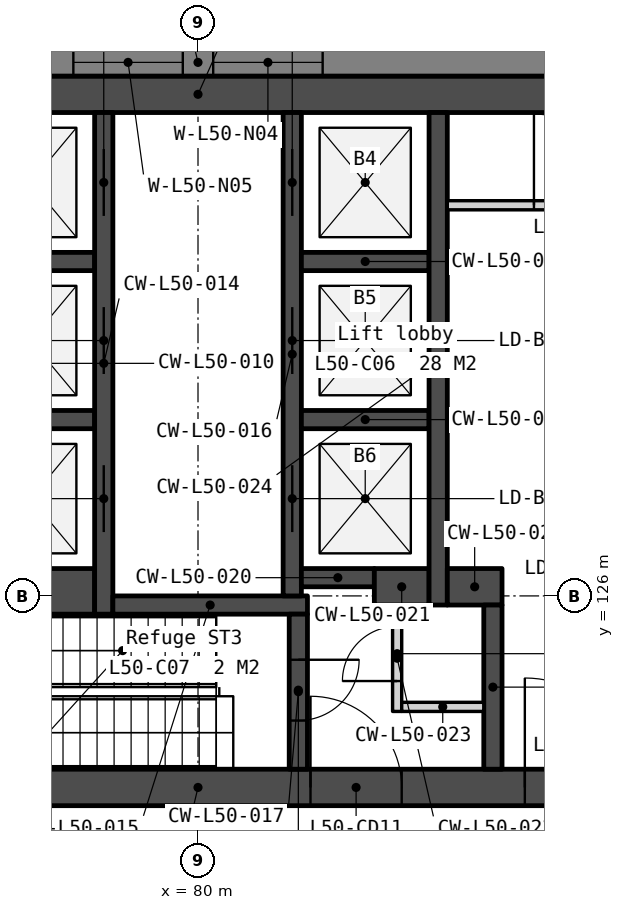
"""IFC4 building model, lengths in metres.
Left out: names, types, materials, properties, quantities, classifications, styles, units other than length and angle.
Written with IfcOpenShell. Run it as: python <this file> out.ifc"""

import sys

from ifc_helpers import new_model, si_unit, direction, frame, frame_2d, origin, place, context, subcontext, project, spatial, polyline, rectangle, outline, extrude, element, fill, save


model = new_model("IFC4")
c1 = context("Model", 3, precision=1e-05, world=origin(), true_north=direction((0.0, 1.0)))
c2 = subcontext(c1, "Body", "Model", "MODEL_VIEW")
j1 = project(units=[si_unit("LENGTHUNIT", "METRE"), si_unit("PLANEANGLEUNIT", "RADIAN")], contexts=[c1])
p1 = place(None, origin())
s1 = spatial("IfcSite", under=j1, at=p1, CompositionType="ELEMENT")
p2 = place(p1, origin())
s2 = spatial("IfcBuilding", under=s1, at=p2, CompositionType="ELEMENT")
p3 = place(p2, frame((0.0, 0.0, 199.7)))
s3 = spatial("IfcBuildingStorey", under=s2, at=p3, CompositionType="ELEMENT", Elevation=199.7)
p4 = place(p3, frame((69.0, 134.25, 0.0), z_axis=(0.0, 0.0, 1.0), x_axis=(1.0, 0.0, 0.0)))
e1 = element("IfcWall", 1, at=p4, inside=s3, PredefinedType="SOLIDWALL", context=c2, shape_type="SweptSolid", body=[
    extrude(rectangle(XDim=22.0, YDim=0.6, at=frame_2d((11.0, 0.0))), origin(), (0.0, 0.0, 1.0), 3.75),
])
p5 = place(p3, frame((69.0, 122.85, 0.0), z_axis=(0.0, 0.0, 1.0), x_axis=(1.0, 0.0, 0.0)))
e2 = element("IfcWall", 2, at=p5, inside=s3, PredefinedType="SOLIDWALL", context=c2, shape_type="SweptSolid", body=[
    extrude(rectangle(XDim=22.0, YDim=0.6, at=frame_2d((11.0, 0.0))), origin(), (0.0, 0.0, 1.0), 3.75),
])
p6 = place(p5, frame((16.375, 0.0, 0.0)))
e3 = element("IfcOpeningElement", 3, at=p6, cuts=e2, PredefinedType="OPENING", context=c2, shape_type="SweptSolid", body=[
    extrude(rectangle(XDim=1.8, YDim=2.1, at=frame_2d((0.9, 1.05))), frame((0.0, 0.31, 0.0), z_axis=(0.0, -1.0, 0.0), x_axis=(1.0, 0.0, 0.0)), (0.0, 0.0, 1.0), 0.62),
])
p7 = place(p5, frame((3.825, 0.0, 0.0)))
e4 = element("IfcOpeningElement", 4, at=p7, cuts=e2, PredefinedType="OPENING", context=c2, shape_type="SweptSolid", body=[
    extrude(rectangle(XDim=1.8, YDim=2.1, at=frame_2d((0.9, 1.05))), frame((0.0, 0.31, 0.0), z_axis=(0.0, -1.0, 0.0), x_axis=(1.0, 0.0, 0.0)), (0.0, 0.0, 1.0), 0.62),
])
p8 = place(p5, frame((12.85, 0.0, 0.0)))
e5 = element("IfcOpeningElement", 5, at=p8, cuts=e2, PredefinedType="OPENING", context=c2, shape_type="SweptSolid", body=[
    extrude(rectangle(XDim=1.5, YDim=2.1, at=frame_2d((0.75, 1.05))), frame((0.0, 0.31, 0.0), z_axis=(0.0, -1.0, 0.0), x_axis=(1.0, 0.0, 0.0)), (0.0, 0.0, 1.0), 0.62),
])
for number, where, z_axis, x_axis in (
    (6, (76.2, 131.5, 0.0), (0.0, 0.0, 1.0), (1.0, 0.0, 0.0)),
    (7, (76.2, 128.9, 0.0), (0.0, 0.0, 1.0), (1.0, 0.0, 0.0)),
):
    element("IfcWall", number, at=place(p3, frame(where, z_axis=z_axis, x_axis=x_axis)), inside=s3, PredefinedType="SOLIDWALL", context=c2, shape_type="SweptSolid", body=[
        extrude(rectangle(XDim=2.1, YDim=0.3, at=frame_2d((1.05, 0.0))), origin(), (0.0, 0.0, 1.0), 3.75),
    ])
p9 = place(p3, frame((76.2, 126.075, 0.0), z_axis=(0.0, 0.0, 1.0), x_axis=(1.0, 0.0, 0.0)))
e8 = element("IfcWall", 8, at=p9, inside=s3, PredefinedType="SOLIDWALL", context=c2, shape_type="SweptSolid", body=[
    extrude(rectangle(XDim=2.1, YDim=0.75, at=frame_2d((1.05, 0.0))), origin(), (0.0, 0.0, 1.0), 3.75),
])
p10 = place(p3, frame((78.45, 133.95, 0.0), z_axis=(0.0, 0.0, 1.0), x_axis=(0.0, -1.0, 0.0)))
e9 = element("IfcWall", 9, at=p10, inside=s3, PredefinedType="SOLIDWALL", context=c2, shape_type="SweptSolid", body=[
    extrude(rectangle(XDim=8.25, YDim=0.3, at=frame_2d((4.125, 0.0))), origin(), (0.0, 0.0, 1.0), 3.75),
])
p11 = place(p10, frame((0.6, 0.0, 0.0)))
e10 = element("IfcOpeningElement", 10, at=p11, cuts=e9, PredefinedType="OPENING", context=c2, shape_type="SweptSolid", body=[
    extrude(rectangle(XDim=1.1, YDim=2.1, at=frame_2d((0.55, 1.05))), frame((0.0, 0.16, 0.0), z_axis=(0.0, -1.0, 0.0), x_axis=(1.0, 0.0, 0.0)), (0.0, 0.0, 1.0), 0.32),
])
p12 = place(p10, frame((3.2, 0.0, 0.0)))
e11 = element("IfcOpeningElement", 11, at=p12, cuts=e9, PredefinedType="OPENING", context=c2, shape_type="SweptSolid", body=[
    extrude(rectangle(XDim=1.1, YDim=2.1, at=frame_2d((0.55, 1.05))), frame((0.0, 0.16, 0.0), z_axis=(0.0, -1.0, 0.0), x_axis=(1.0, 0.0, 0.0)), (0.0, 0.0, 1.0), 0.32),
])
p13 = place(p10, frame((5.8, 0.0, 0.0)))
e12 = element("IfcOpeningElement", 12, at=p13, cuts=e9, PredefinedType="OPENING", context=c2, shape_type="SweptSolid", body=[
    extrude(rectangle(XDim=1.1, YDim=2.1, at=frame_2d((0.55, 1.05))), frame((0.0, 0.16, 0.0), z_axis=(0.0, -1.0, 0.0), x_axis=(1.0, 0.0, 0.0)), (0.0, 0.0, 1.0), 0.32),
])
p14 = place(p3, frame((78.6, 125.85, 0.0), z_axis=(0.0, 0.0, 1.0), x_axis=(1.0, 0.0, 0.0)))
e13 = element("IfcWall", 13, at=p14, inside=s3, PredefinedType="SOLIDWALL", context=c2, shape_type="SweptSolid", body=[
    extrude(rectangle(XDim=3.2, YDim=0.3, at=frame_2d((1.6, 0.0))), origin(), (0.0, 0.0, 1.0), 3.75),
])
p15 = place(p3, frame((81.55, 133.95, 0.0), z_axis=(0.0, 0.0, 1.0), x_axis=(0.0, -1.0, 0.0)))
e14 = element("IfcWall", 14, at=p15, inside=s3, PredefinedType="SOLIDWALL", context=c2, shape_type="SweptSolid", body=[
    extrude(rectangle(XDim=7.95, YDim=0.3, at=frame_2d((3.975, 0.0))), origin(), (0.0, 0.0, 1.0), 3.75),
])
p16 = place(p15, frame((0.6, 0.0, 0.0)))
e15 = element("IfcOpeningElement", 15, at=p16, cuts=e14, PredefinedType="OPENING", context=c2, shape_type="SweptSolid", body=[
    extrude(rectangle(XDim=1.1, YDim=2.1, at=frame_2d((0.55, 1.05))), frame((0.0, 0.16, 0.0), z_axis=(0.0, -1.0, 0.0), x_axis=(1.0, 0.0, 0.0)), (0.0, 0.0, 1.0), 0.32),
])
p17 = place(p15, frame((3.2, 0.0, 0.0)))
e16 = element("IfcOpeningElement", 16, at=p17, cuts=e14, PredefinedType="OPENING", context=c2, shape_type="SweptSolid", body=[
    extrude(rectangle(XDim=1.1, YDim=2.1, at=frame_2d((0.55, 1.05))), frame((0.0, 0.16, 0.0), z_axis=(0.0, -1.0, 0.0), x_axis=(1.0, 0.0, 0.0)), (0.0, 0.0, 1.0), 0.32),
])
p18 = place(p15, frame((5.8, 0.0, 0.0)))
e17 = element("IfcOpeningElement", 17, at=p18, cuts=e14, PredefinedType="OPENING", context=c2, shape_type="SweptSolid", body=[
    extrude(rectangle(XDim=1.1, YDim=2.1, at=frame_2d((0.55, 1.05))), frame((0.0, 0.16, 0.0), z_axis=(0.0, -1.0, 0.0), x_axis=(1.0, 0.0, 0.0)), (0.0, 0.0, 1.0), 0.32),
])
p19 = place(p3, frame((81.65, 125.7, 0.0), z_axis=(0.0, 0.0, 1.0), x_axis=(0.0, -1.0, 0.0)))
e18 = element("IfcWall", 18, at=p19, inside=s3, PredefinedType="SOLIDWALL", context=c2, shape_type="SweptSolid", body=[
    extrude(rectangle(XDim=2.55, YDim=0.3, at=frame_2d((1.275, 0.0))), origin(), (0.0, 0.0, 1.0), 3.75),
])
p20 = place(p19, frame((0.75, 0.0, 0.0)))
e19 = element("IfcOpeningElement", 19, at=p20, cuts=e18, PredefinedType="OPENING", context=c2, shape_type="SweptSolid", body=[
    extrude(rectangle(XDim=1.0, YDim=2.1, at=frame_2d((0.5, 1.05))), frame((0.0, 0.16, 0.0), z_axis=(0.0, -1.0, 0.0), x_axis=(1.0, 0.0, 0.0)), (0.0, 0.0, 1.0), 0.32),
])
for number, where, z_axis, x_axis in (
    (20, (81.7, 131.5, 0.0), (0.0, 0.0, 1.0), (1.0, 0.0, 0.0)),
    (21, (81.7, 128.9, 0.0), (0.0, 0.0, 1.0), (1.0, 0.0, 0.0)),
):
    element("IfcWall", number, at=place(p3, frame(where, z_axis=z_axis, x_axis=x_axis)), inside=s3, PredefinedType="SOLIDWALL", context=c2, shape_type="SweptSolid", body=[
        extrude(rectangle(XDim=2.1, YDim=0.3, at=frame_2d((1.05, 0.0))), origin(), (0.0, 0.0, 1.0), 3.75),
    ])
p21 = place(p3, frame((81.7, 126.3, 0.0), z_axis=(0.0, 0.0, 1.0), x_axis=(1.0, 0.0, 0.0)))
e22 = element("IfcWall", 22, at=p21, inside=s3, PredefinedType="SOLIDWALL", context=c2, shape_type="SweptSolid", body=[
    extrude(rectangle(XDim=1.2, YDim=0.3, at=frame_2d((0.6, 0.0))), origin(), (0.0, 0.0, 1.0), 3.75),
])
p22 = place(p3, frame((82.9, 126.15, 0.0), z_axis=(0.0, 0.0, 1.0), x_axis=(1.0, 0.0, 0.0)))
e23 = element("IfcWall", 23, at=p22, inside=s3, PredefinedType="SOLIDWALL", context=c2, shape_type="SweptSolid", body=[
    extrude(rectangle(XDim=0.9, YDim=0.6, at=frame_2d((0.45, 0.0))), origin(), (0.0, 0.0, 1.0), 3.75),
])
p23 = place(p3, frame((83.275, 125.85, 0.0), z_axis=(0.0, 0.0, 1.0), x_axis=(0.0, -1.0, 0.0)))
e24 = element("IfcWall", 24, at=p23, inside=s3, PredefinedType="PARTITIONING", context=c2, shape_type="SweptSolid", body=[
    extrude(rectangle(XDim=1.75, YDim=0.15, at=frame_2d((0.875, 0.0))), origin(), (0.0, 0.0, 1.0), 3.75),
])
p24 = place(p23, frame((0.35, 0.0, 0.0)))
e25 = element("IfcOpeningElement", 25, at=p24, cuts=e24, PredefinedType="OPENING", context=c2, shape_type="SweptSolid", body=[
    extrude(rectangle(XDim=0.9, YDim=2.1, at=frame_2d((0.45, 1.05))), frame((0.0, 0.085, 0.0), z_axis=(0.0, -1.0, 0.0), x_axis=(1.0, 0.0, 0.0)), (0.0, 0.0, 1.0), 0.17),
])
p25 = place(p3, frame((83.35, 124.175, 0.0), z_axis=(0.0, 0.0, 1.0), x_axis=(1.0, 0.0, 0.0)))
e26 = element("IfcWall", 26, at=p25, inside=s3, PredefinedType="PARTITIONING", context=c2, shape_type="SweptSolid", body=[
    extrude(rectangle(XDim=1.35, YDim=0.15, at=frame_2d((0.675, 0.0))), origin(), (0.0, 0.0, 1.0), 3.75),
])
p26 = place(p3, frame((83.95, 133.95, 0.0), z_axis=(0.0, 0.0, 1.0), x_axis=(0.0, -1.0, 0.0)))
e27 = element("IfcWall", 27, at=p26, inside=s3, PredefinedType="SOLIDWALL", context=c2, shape_type="SweptSolid", body=[
    extrude(rectangle(XDim=8.1, YDim=0.3, at=frame_2d((4.05, 0.0))), origin(), (0.0, 0.0, 1.0), 3.75),
])
p27 = place(p3, frame((84.1, 132.425, 0.0), z_axis=(0.0, 0.0, 1.0), x_axis=(1.0, 0.0, 0.0)))
e28 = element("IfcWall", 28, at=p27, inside=s3, PredefinedType="PARTITIONING", context=c2, shape_type="SweptSolid", body=[
    extrude(rectangle(XDim=3.45, YDim=0.15, at=frame_2d((1.725, 0.0))), origin(), (0.0, 0.0, 1.0), 3.75),
])
p28 = place(p27, frame((1.425, 0.0, 0.0)))
e29 = element("IfcOpeningElement", 29, at=p28, cuts=e28, PredefinedType="OPENING", context=c2, shape_type="SweptSolid", body=[
    extrude(rectangle(XDim=1.5, YDim=2.1, at=frame_2d((0.75, 1.05))), frame((0.0, 0.085, 0.0), z_axis=(0.0, -1.0, 0.0), x_axis=(1.0, 0.0, 0.0)), (0.0, 0.0, 1.0), 0.17),
])
p29 = place(p3, frame((84.1, 126.15, 0.0), z_axis=(0.0, 0.0, 1.0), x_axis=(1.0, 0.0, 0.0)))
e30 = element("IfcWall", 30, at=p29, inside=s3, PredefinedType="SOLIDWALL", context=c2, shape_type="SweptSolid", body=[
    extrude(rectangle(XDim=0.9, YDim=0.6, at=frame_2d((0.45, 0.0))), origin(), (0.0, 0.0, 1.0), 3.75),
])
p30 = place(p3, frame((84.85, 125.85, 0.0), z_axis=(0.0, 0.0, 1.0), x_axis=(0.0, -1.0, 0.0)))
e31 = element("IfcWall", 31, at=p30, inside=s3, PredefinedType="SOLIDWALL", context=c2, shape_type="SweptSolid", body=[
    extrude(rectangle(XDim=2.7, YDim=0.3, at=frame_2d((1.35, 0.0))), origin(), (0.0, 0.0, 1.0), 3.75),
])
p31 = place(p3, frame((99.365, 134.775, -0.15), z_axis=(0.0, 0.0, 1.0), x_axis=(-1.0, 0.0, 0.0)))
e32 = element("IfcWall", 32, at=p31, inside=s3, PredefinedType="SOLIDWALL", context=c2, shape_type="SweptSolid", body=[
    extrude(outline(polyline([(38.729, 0.0), (38.729, 3.9), (0.0, 3.9), (0.0, 0.0), (38.729, 0.0)])), frame((0.0, 0.225, 0.0), z_axis=(0.0, -1.0, 0.0), x_axis=(1.0, 0.0, 0.0)), (0.0, 0.0, 1.0), 0.45),
])
p32 = place(p31, frame((0.776, 0.0, 0.95)))
e33 = element("IfcOpeningElement", 33, at=p32, cuts=e32, PredefinedType="OPENING", context=c2, shape_type="SweptSolid", body=[
    extrude(rectangle(XDim=1.2, YDim=2.2, at=frame_2d((0.6, 1.1))), frame((0.0, 0.235, 0.0), z_axis=(0.0, -1.0, 0.0), x_axis=(1.0, 0.0, 0.0)), (0.0, 0.0, 1.0), 0.47),
])
p33 = place(p31, frame((7.632, 0.0, 0.95)))
e34 = element("IfcOpeningElement", 34, at=p33, cuts=e32, PredefinedType="OPENING", context=c2, shape_type="SweptSolid", body=[
    extrude(rectangle(XDim=1.8, YDim=2.2, at=frame_2d((0.9, 1.1))), frame((0.0, 0.235, 0.0), z_axis=(0.0, -1.0, 0.0), x_axis=(1.0, 0.0, 0.0)), (0.0, 0.0, 1.0), 0.47),
])
p34 = place(p31, frame((9.932, 0.0, 0.95)))
e35 = element("IfcOpeningElement", 35, at=p34, cuts=e32, PredefinedType="OPENING", context=c2, shape_type="SweptSolid", body=[
    extrude(rectangle(XDim=1.8, YDim=2.2, at=frame_2d((0.9, 1.1))), frame((0.0, 0.235, 0.0), z_axis=(0.0, -1.0, 0.0), x_axis=(1.0, 0.0, 0.0)), (0.0, 0.0, 1.0), 0.47),
])
p35 = place(p31, frame((17.315, 0.0, 0.95)))
e36 = element("IfcOpeningElement", 36, at=p35, cuts=e32, PredefinedType="OPENING", context=c2, shape_type="SweptSolid", body=[
    extrude(rectangle(XDim=1.8, YDim=2.2, at=frame_2d((0.9, 1.1))), frame((0.0, 0.235, 0.0), z_axis=(0.0, -1.0, 0.0), x_axis=(1.0, 0.0, 0.0)), (0.0, 0.0, 1.0), 0.47),
])
p36 = place(p31, frame((19.615, 0.0, 0.95)))
e37 = element("IfcOpeningElement", 37, at=p36, cuts=e32, PredefinedType="OPENING", context=c2, shape_type="SweptSolid", body=[
    extrude(rectangle(XDim=1.8, YDim=2.2, at=frame_2d((0.9, 1.1))), frame((0.0, 0.235, 0.0), z_axis=(0.0, -1.0, 0.0), x_axis=(1.0, 0.0, 0.0)), (0.0, 0.0, 1.0), 0.47),
])
p37 = place(p31, frame((26.997, 0.0, 0.95)))
e38 = element("IfcOpeningElement", 38, at=p37, cuts=e32, PredefinedType="OPENING", context=c2, shape_type="SweptSolid", body=[
    extrude(rectangle(XDim=1.8, YDim=2.2, at=frame_2d((0.9, 1.1))), frame((0.0, 0.235, 0.0), z_axis=(0.0, -1.0, 0.0), x_axis=(1.0, 0.0, 0.0)), (0.0, 0.0, 1.0), 0.47),
])
p38 = place(p31, frame((29.297, 0.0, 0.95)))
e39 = element("IfcOpeningElement", 39, at=p38, cuts=e32, PredefinedType="OPENING", context=c2, shape_type="SweptSolid", body=[
    extrude(rectangle(XDim=1.8, YDim=2.2, at=frame_2d((0.9, 1.1))), frame((0.0, 0.235, 0.0), z_axis=(0.0, -1.0, 0.0), x_axis=(1.0, 0.0, 0.0)), (0.0, 0.0, 1.0), 0.47),
])
p39 = place(p31, frame((36.753, 0.0, 0.95)))
e40 = element("IfcOpeningElement", 40, at=p39, cuts=e32, PredefinedType="OPENING", context=c2, shape_type="SweptSolid", body=[
    extrude(rectangle(XDim=1.2, YDim=2.2, at=frame_2d((0.6, 1.1))), frame((0.0, 0.235, 0.0), z_axis=(0.0, -1.0, 0.0), x_axis=(1.0, 0.0, 0.0)), (0.0, 0.0, 1.0), 0.47),
])
p40 = place(p3, frame((81.505, 98.627, -0.15), z_axis=(0.0, 0.0, 1.0), x_axis=(0.500002199942, 0.866024133644, 0.0)))
e41 = element("IfcWall", 41, at=p40, inside=s3, PredefinedType="SOLIDWALL", context=c2, shape_type="SweptSolid", body=[
    extrude(outline(polyline([(38.729, 0.0), (38.729, 3.9), (0.0, 3.9), (0.0, 0.0), (38.729, 0.0)])), frame((0.0, 0.225, 0.0), z_axis=(0.0, -1.0, 0.0), x_axis=(1.0, 0.0, 0.0)), (0.0, 0.0, 1.0), 0.45),
])
p41 = place(p40, frame((0.776, 0.0, 0.95)))
e42 = element("IfcOpeningElement", 42, at=p41, cuts=e41, PredefinedType="OPENING", context=c2, shape_type="SweptSolid", body=[
    extrude(rectangle(XDim=1.2, YDim=2.2, at=frame_2d((0.6, 1.1))), frame((0.0, 0.235, 0.0), z_axis=(0.0, -1.0, 0.0), x_axis=(1.0, 0.0, 0.0)), (0.0, 0.0, 1.0), 0.47),
])
p42 = place(p40, frame((7.632, 0.0, 0.95)))
e43 = element("IfcOpeningElement", 43, at=p42, cuts=e41, PredefinedType="OPENING", context=c2, shape_type="SweptSolid", body=[
    extrude(rectangle(XDim=1.8, YDim=2.2, at=frame_2d((0.9, 1.1))), frame((0.0, 0.235, 0.0), z_axis=(0.0, -1.0, 0.0), x_axis=(1.0, 0.0, 0.0)), (0.0, 0.0, 1.0), 0.47),
])
p43 = place(p40, frame((9.932, 0.0, 0.95)))
e44 = element("IfcOpeningElement", 44, at=p43, cuts=e41, PredefinedType="OPENING", context=c2, shape_type="SweptSolid", body=[
    extrude(rectangle(XDim=1.8, YDim=2.2, at=frame_2d((0.9, 1.1))), frame((0.0, 0.235, 0.0), z_axis=(0.0, -1.0, 0.0), x_axis=(1.0, 0.0, 0.0)), (0.0, 0.0, 1.0), 0.47),
])
p44 = place(p40, frame((17.315, 0.0, 0.95)))
e45 = element("IfcOpeningElement", 45, at=p44, cuts=e41, PredefinedType="OPENING", context=c2, shape_type="SweptSolid", body=[
    extrude(rectangle(XDim=1.8, YDim=2.2, at=frame_2d((0.9, 1.1))), frame((0.0, 0.235, 0.0), z_axis=(0.0, -1.0, 0.0), x_axis=(1.0, 0.0, 0.0)), (0.0, 0.0, 1.0), 0.47),
])
p45 = place(p40, frame((19.615, 0.0, 0.95)))
e46 = element("IfcOpeningElement", 46, at=p45, cuts=e41, PredefinedType="OPENING", context=c2, shape_type="SweptSolid", body=[
    extrude(rectangle(XDim=1.8, YDim=2.2, at=frame_2d((0.9, 1.1))), frame((0.0, 0.235, 0.0), z_axis=(0.0, -1.0, 0.0), x_axis=(1.0, 0.0, 0.0)), (0.0, 0.0, 1.0), 0.47),
])
p46 = place(p40, frame((26.997, 0.0, 0.95)))
e47 = element("IfcOpeningElement", 47, at=p46, cuts=e41, PredefinedType="OPENING", context=c2, shape_type="SweptSolid", body=[
    extrude(rectangle(XDim=1.8, YDim=2.2, at=frame_2d((0.9, 1.1))), frame((0.0, 0.235, 0.0), z_axis=(0.0, -1.0, 0.0), x_axis=(1.0, 0.0, 0.0)), (0.0, 0.0, 1.0), 0.47),
])
p47 = place(p40, frame((29.297, 0.0, 0.95)))
e48 = element("IfcOpeningElement", 48, at=p47, cuts=e41, PredefinedType="OPENING", context=c2, shape_type="SweptSolid", body=[
    extrude(rectangle(XDim=1.8, YDim=2.2, at=frame_2d((0.9, 1.1))), frame((0.0, 0.235, 0.0), z_axis=(0.0, -1.0, 0.0), x_axis=(1.0, 0.0, 0.0)), (0.0, 0.0, 1.0), 0.47),
])
p48 = place(p40, frame((36.753, 0.0, 0.95)))
e49 = element("IfcOpeningElement", 49, at=p48, cuts=e41, PredefinedType="OPENING", context=c2, shape_type="SweptSolid", body=[
    extrude(rectangle(XDim=1.2, YDim=2.2, at=frame_2d((0.6, 1.1))), frame((0.0, 0.235, 0.0), z_axis=(0.0, -1.0, 0.0), x_axis=(1.0, 0.0, 0.0)), (0.0, 0.0, 1.0), 0.47),
])
p49 = place(p11, origin())
e50 = element("IfcDoor", 50, at=p49, inside=s3, OperationType="SLIDING_TO_RIGHT", PredefinedType="DOOR", context=c2, shape_type="SweptSolid", body=[
    extrude(rectangle(XDim=1.1, YDim=2.1, at=frame_2d((0.55, 1.05))), frame((0.0, 0.025, 0.0), z_axis=(0.0, -1.0, 0.0), x_axis=(1.0, 0.0, 0.0)), (0.0, 0.0, 1.0), 0.05),
])
fill(e10, e50)
p50 = place(p12, origin())
e51 = element("IfcDoor", 51, at=p50, inside=s3, OperationType="SLIDING_TO_RIGHT", PredefinedType="DOOR", context=c2, shape_type="SweptSolid", body=[
    extrude(rectangle(XDim=1.1, YDim=2.1, at=frame_2d((0.55, 1.05))), frame((0.0, 0.025, 0.0), z_axis=(0.0, -1.0, 0.0), x_axis=(1.0, 0.0, 0.0)), (0.0, 0.0, 1.0), 0.05),
])
fill(e11, e51)
p51 = place(p13, origin())
e52 = element("IfcDoor", 52, at=p51, inside=s3, OperationType="SLIDING_TO_RIGHT", PredefinedType="DOOR", context=c2, shape_type="SweptSolid", body=[
    extrude(rectangle(XDim=1.1, YDim=2.1, at=frame_2d((0.55, 1.05))), frame((0.0, 0.025, 0.0), z_axis=(0.0, -1.0, 0.0), x_axis=(1.0, 0.0, 0.0)), (0.0, 0.0, 1.0), 0.05),
])
fill(e12, e52)
p52 = place(p16, origin())
e53 = element("IfcDoor", 53, at=p52, inside=s3, OperationType="SLIDING_TO_LEFT", PredefinedType="DOOR", context=c2, shape_type="SweptSolid", body=[
    extrude(rectangle(XDim=1.1, YDim=2.1, at=frame_2d((0.55, 1.05))), frame((0.0, 0.025, 0.0), z_axis=(0.0, -1.0, 0.0), x_axis=(1.0, 0.0, 0.0)), (0.0, 0.0, 1.0), 0.05),
])
fill(e15, e53)
p53 = place(p17, origin())
e54 = element("IfcDoor", 54, at=p53, inside=s3, OperationType="SLIDING_TO_LEFT", PredefinedType="DOOR", context=c2, shape_type="SweptSolid", body=[
    extrude(rectangle(XDim=1.1, YDim=2.1, at=frame_2d((0.55, 1.05))), frame((0.0, 0.025, 0.0), z_axis=(0.0, -1.0, 0.0), x_axis=(1.0, 0.0, 0.0)), (0.0, 0.0, 1.0), 0.05),
])
fill(e16, e54)
p54 = place(p18, origin())
e55 = element("IfcDoor", 55, at=p54, inside=s3, OperationType="SLIDING_TO_LEFT", PredefinedType="DOOR", context=c2, shape_type="SweptSolid", body=[
    extrude(rectangle(XDim=1.1, YDim=2.1, at=frame_2d((0.55, 1.05))), frame((0.0, 0.025, 0.0), z_axis=(0.0, -1.0, 0.0), x_axis=(1.0, 0.0, 0.0)), (0.0, 0.0, 1.0), 0.05),
])
fill(e17, e55)
p55 = place(p6, origin())
e56 = element("IfcDoor", 56, at=p55, inside=s3, OperationType="DOUBLE_DOOR_DOUBLE_SWING", PredefinedType="DOOR", context=c2, shape_type="SweptSolid", body=[
    extrude(rectangle(XDim=1.8, YDim=2.1, at=frame_2d((0.9, 1.05))), frame((0.0, 0.025, 0.0), z_axis=(0.0, -1.0, 0.0), x_axis=(1.0, 0.0, 0.0)), (0.0, 0.0, 1.0), 0.05),
])
fill(e3, e56)
p56 = place(p8, origin())
e57 = element("IfcDoor", 57, at=p56, inside=s3, OperationType="DOUBLE_DOOR_DOUBLE_SWING", PredefinedType="DOOR", context=c2, shape_type="SweptSolid", body=[
    extrude(rectangle(XDim=1.5, YDim=2.1, at=frame_2d((0.75, 1.05))), frame((0.0, 0.025, 0.0), z_axis=(0.0, -1.0, 0.0), x_axis=(1.0, 0.0, 0.0)), (0.0, 0.0, 1.0), 0.05),
])
fill(e5, e57)
p57 = place(p24, origin())
e58 = element("IfcDoor", 58, at=p57, inside=s3, OperationType="SINGLE_SWING_RIGHT", PredefinedType="DOOR", context=c2, shape_type="SweptSolid", body=[
    extrude(rectangle(XDim=0.9, YDim=2.1, at=frame_2d((0.45, 1.05))), frame((0.0, 0.025, 0.0), z_axis=(0.0, -1.0, 0.0), x_axis=(1.0, 0.0, 0.0)), (0.0, 0.0, 1.0), 0.05),
])
fill(e25, e58)
p58 = place(p28, origin())
e59 = element("IfcDoor", 59, at=p58, inside=s3, OperationType="DOUBLE_DOOR_DOUBLE_SWING", PredefinedType="DOOR", context=c2, shape_type="SweptSolid", body=[
    extrude(rectangle(XDim=1.5, YDim=2.1, at=frame_2d((0.75, 1.05))), frame((0.0, 0.025, 0.0), z_axis=(0.0, -1.0, 0.0), x_axis=(1.0, 0.0, 0.0)), (0.0, 0.0, 1.0), 0.05),
])
fill(e29, e59)
p59 = place(p20, origin())
e60 = element("IfcDoor", 60, at=p59, inside=s3, OperationType="SINGLE_SWING_LEFT", PredefinedType="DOOR", context=c2, shape_type="SweptSolid", body=[
    extrude(rectangle(XDim=1.0, YDim=2.1, at=frame_2d((0.5, 1.05))), frame((0.0, 0.025, 0.0), z_axis=(0.0, -1.0, 0.0), x_axis=(1.0, 0.0, 0.0)), (0.0, 0.0, 1.0), 0.05),
])
fill(e19, e60)
p60 = place(p35, origin())
e61 = element("IfcWindow", 61, at=p60, inside=s3, PartitioningType="SINGLE_PANEL", PredefinedType="WINDOW", context=c2, shape_type="SweptSolid", body=[
    extrude(rectangle(XDim=1.8, YDim=2.2, at=frame_2d((0.9, 1.1))), frame((0.0, 0.03, 0.0), z_axis=(0.0, -1.0, 0.0), x_axis=(1.0, 0.0, 0.0)), (0.0, 0.0, 1.0), 0.06),
])
fill(e36, e61)
p61 = place(p36, origin())
e62 = element("IfcWindow", 62, at=p61, inside=s3, PartitioningType="SINGLE_PANEL", PredefinedType="WINDOW", context=c2, shape_type="SweptSolid", body=[
    extrude(rectangle(XDim=1.8, YDim=2.2, at=frame_2d((0.9, 1.1))), frame((0.0, 0.03, 0.0), z_axis=(0.0, -1.0, 0.0), x_axis=(1.0, 0.0, 0.0)), (0.0, 0.0, 1.0), 0.06),
])
fill(e37, e62)
save(model, sys.argv[1])
